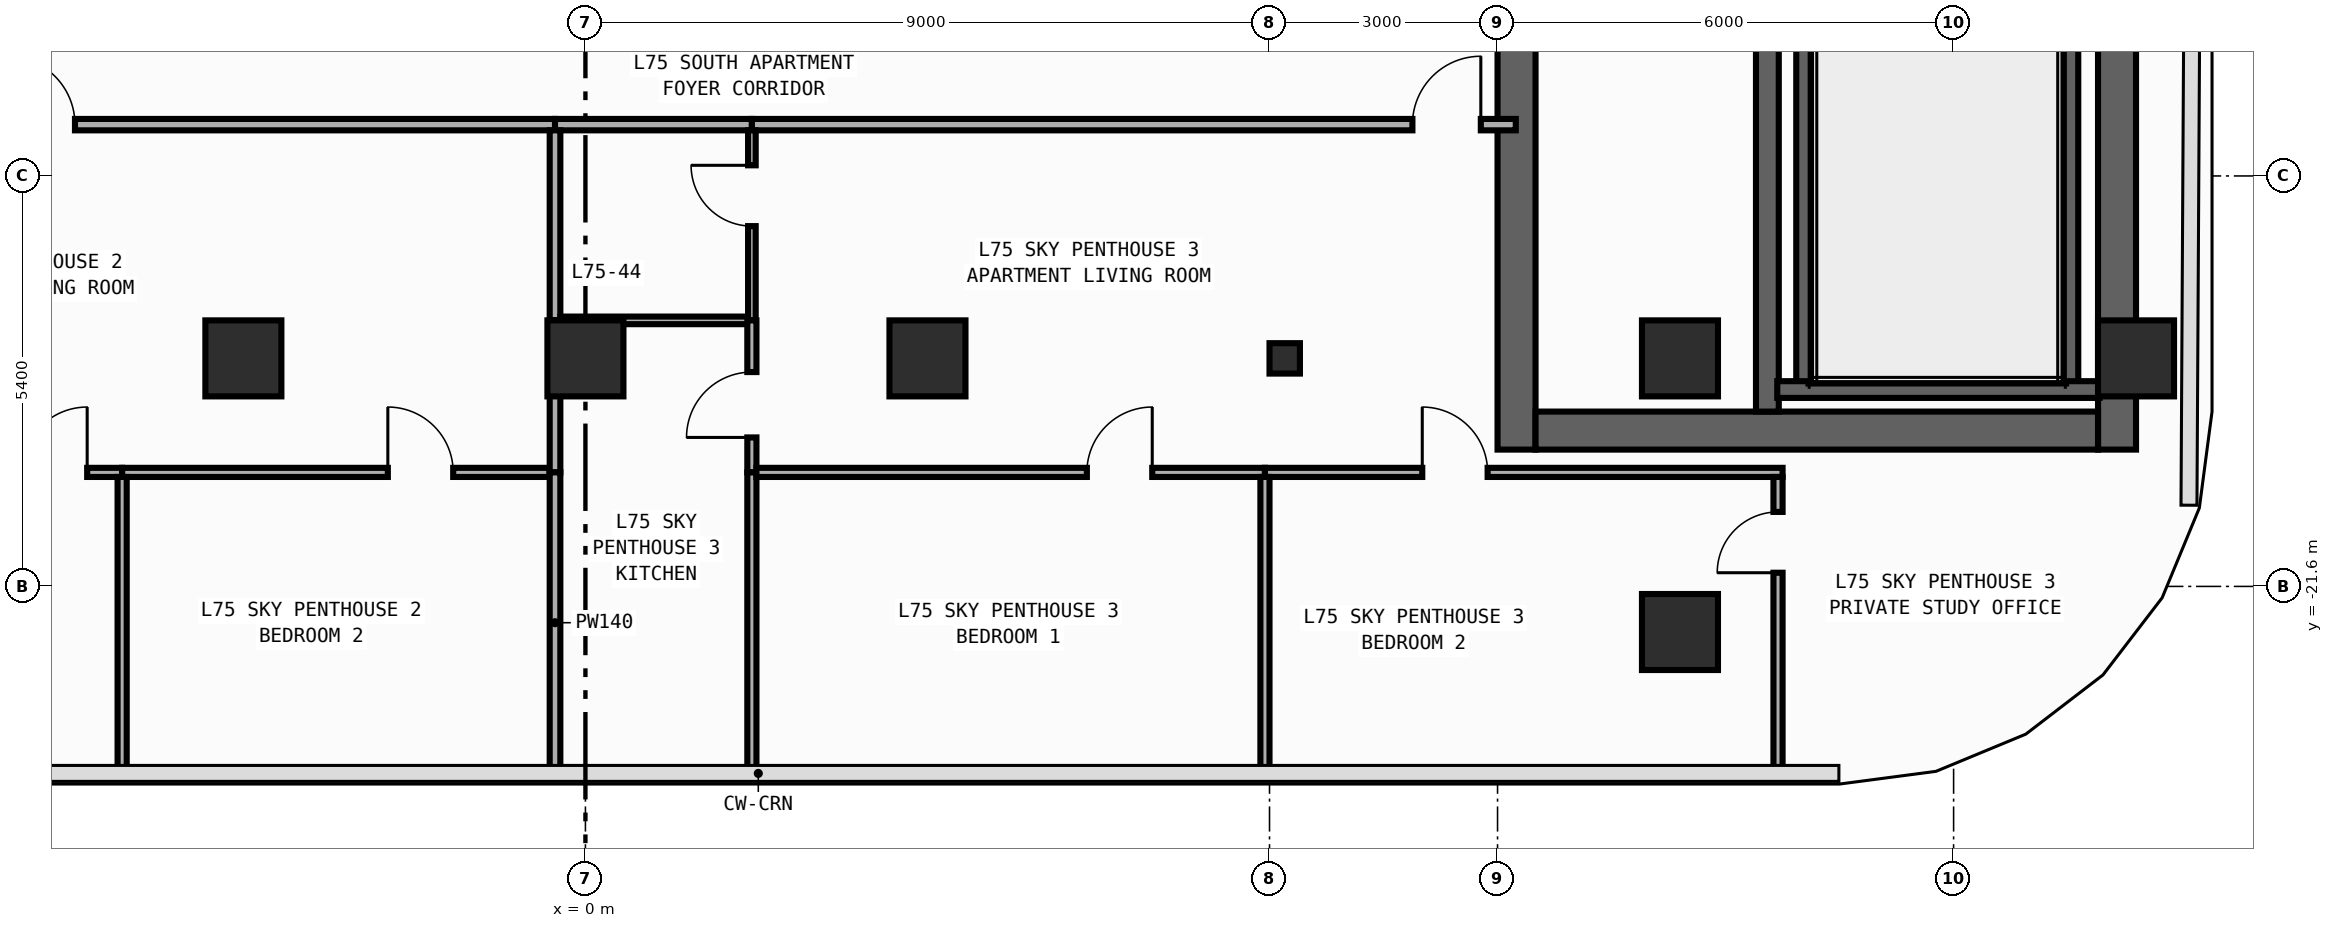
"""IFC4 building model, lengths in metres.
Left out: names, types, materials, properties, quantities, classifications, styles, units other than length and angle.
Written with IfcOpenShell. Run it as: python <this file> out.ifc"""

import sys

from ifc_helpers import new_model, si_unit, direction, frame, frame_2d, origin, origin_2d, place, context, subcontext, project, spatial, rectangle, circle, i_section, extrude, element, fill, save


model = new_model("IFC4")
c1 = context("Model", 3, precision=1e-05, world=origin(), true_north=direction((0.0, 1.0)))
c2 = subcontext(c1, "Body", "Model", "MODEL_VIEW")
j1 = project(units=[si_unit("LENGTHUNIT", "METRE"), si_unit("PLANEANGLEUNIT", "RADIAN")], contexts=[c1])
p1 = place(None, origin())
s1 = spatial("IfcSite", under=j1, at=p1, CompositionType="ELEMENT")
p2 = place(p1, origin())
s2 = spatial("IfcBuilding", under=s1, at=p2, CompositionType="ELEMENT")
p3 = place(p2, frame((0.0, 0.0, 311.8)))
s3 = spatial("IfcBuildingStorey", under=s2, at=p3, CompositionType="ELEMENT", Elevation=311.8)
p4 = place(p3, frame((12.25, -19.8, 0.0), z_axis=(0.0, 0.0, 1.0), x_axis=(0.0, 1.0, 0.0)))
e1 = element("IfcWall", 1, at=p4, inside=s3, PredefinedType="SHEAR", context=c2, shape_type="SweptSolid", body=[
    extrude(rectangle(XDim=27.0, YDim=0.5, at=frame_2d((13.5, 0.0))), origin(), (0.0, 0.0, 1.0), 3.54),
])
p5 = place(p4, frame((23.05, 0.0, 0.0)))
e2 = element("IfcOpeningElement", 2, at=p5, cuts=e1, PredefinedType="OPENING", context=c2, shape_type="SweptSolid", body=[
    extrude(rectangle(XDim=1.1, YDim=2.2, at=frame_2d((0.55, 1.1))), frame((0.0, 0.26, 0.0), z_axis=(0.0, -1.0, 0.0), x_axis=(1.0, 0.0, 0.0)), (0.0, 0.0, 1.0), 0.52),
])
p6 = place(p4, frame((19.85, 0.0, 0.0)))
e3 = element("IfcOpeningElement", 3, at=p6, cuts=e1, PredefinedType="OPENING", context=c2, shape_type="SweptSolid", body=[
    extrude(rectangle(XDim=1.1, YDim=2.2, at=frame_2d((0.55, 1.1))), frame((0.0, 0.26, 0.0), z_axis=(0.0, -1.0, 0.0), x_axis=(1.0, 0.0, 0.0)), (0.0, 0.0, 1.0), 0.52),
])
p7 = place(p4, frame((16.65, 0.0, 0.0)))
e4 = element("IfcOpeningElement", 4, at=p7, cuts=e1, PredefinedType="OPENING", context=c2, shape_type="SweptSolid", body=[
    extrude(rectangle(XDim=1.1, YDim=2.2, at=frame_2d((0.55, 1.1))), frame((0.0, 0.26, 0.0), z_axis=(0.0, -1.0, 0.0), x_axis=(1.0, 0.0, 0.0)), (0.0, 0.0, 1.0), 0.52),
])
p8 = place(p4, frame((10.175, 0.0, 0.0)))
e5 = element("IfcOpeningElement", 5, at=p8, cuts=e1, PredefinedType="OPENING", context=c2, shape_type="SweptSolid", body=[
    extrude(rectangle(XDim=0.85, YDim=2.1, at=frame_2d((0.425, 1.05))), frame((0.0, 0.26, 0.0), z_axis=(0.0, -1.0, 0.0), x_axis=(1.0, 0.0, 0.0)), (0.0, 0.0, 1.0), 0.52),
])
p9 = place(p4, frame((12.725, 0.0, 0.0)))
e6 = element("IfcOpeningElement", 6, at=p9, cuts=e1, PredefinedType="OPENING", context=c2, shape_type="SweptSolid", body=[
    extrude(rectangle(XDim=1.15, YDim=2.2, at=frame_2d((0.575, 1.1))), frame((0.0, 0.26, 0.0), z_axis=(0.0, -1.0, 0.0), x_axis=(1.0, 0.0, 0.0)), (0.0, 0.0, 1.0), 0.52),
])
p10 = place(p4, frame((25.125, 0.0, 0.0)))
e7 = element("IfcOpeningElement", 7, at=p10, cuts=e1, PredefinedType="OPENING", context=c2, shape_type="SweptSolid", body=[
    extrude(rectangle(XDim=0.85, YDim=2.1, at=frame_2d((0.425, 1.05))), frame((0.0, 0.26, 0.0), z_axis=(0.0, -1.0, 0.0), x_axis=(1.0, 0.0, 0.0)), (0.0, 0.0, 1.0), 0.52),
])
p11 = place(p3, frame((20.15, -19.8, 0.0), z_axis=(0.0, 0.0, 1.0), x_axis=(0.0, 1.0, 0.0)))
e8 = element("IfcWall", 8, at=p11, inside=s3, PredefinedType="SHEAR", context=c2, shape_type="SweptSolid", body=[
    extrude(rectangle(XDim=27.0, YDim=0.5, at=frame_2d((13.5, 0.0))), origin(), (0.0, 0.0, 1.0), 3.54),
])
p12 = place(p3, frame((12.5, -19.55, 0.0), z_axis=(0.0, 0.0, 1.0), x_axis=(1.0, 0.0, 0.0)))
e9 = element("IfcWall", 9, at=p12, inside=s3, PredefinedType="SHEAR", context=c2, shape_type="SweptSolid", body=[
    extrude(rectangle(XDim=7.4, YDim=0.5, at=frame_2d((3.7, 0.0))), origin(), (0.0, 0.0, 1.0), 3.54),
])
p13 = place(p3, frame((15.55, -19.3, 0.0), z_axis=(0.0, 0.0, 1.0), x_axis=(0.0, 1.0, 0.0)))
e10 = element("IfcWall", 10, at=p13, inside=s3, PredefinedType="SHEAR", context=c2, shape_type="SweptSolid", body=[
    extrude(rectangle(XDim=26.0, YDim=0.3, at=frame_2d((13.0, 0.0))), origin(), (0.0, 0.0, 1.0), 3.54),
])
p14 = place(p13, frame((12.225, 0.0, 0.0)))
e11 = element("IfcOpeningElement", 11, at=p14, cuts=e10, PredefinedType="OPENING", context=c2, shape_type="SweptSolid", body=[
    extrude(rectangle(XDim=1.15, YDim=2.2, at=frame_2d((0.575, 1.1))), frame((0.0, 0.16, 0.0), z_axis=(0.0, -1.0, 0.0), x_axis=(1.0, 0.0, 0.0)), (0.0, 0.0, 1.0), 0.32),
])
p15 = place(p13, frame((24.625, 0.0, 0.0)))
e12 = element("IfcOpeningElement", 12, at=p15, cuts=e10, PredefinedType="OPENING", context=c2, shape_type="SweptSolid", body=[
    extrude(rectangle(XDim=0.85, YDim=2.1, at=frame_2d((0.425, 1.05))), frame((0.0, 0.16, 0.0), z_axis=(0.0, -1.0, 0.0), x_axis=(1.0, 0.0, 0.0)), (0.0, 0.0, 1.0), 0.32),
])
for number, where, z_axis, x_axis in (
    (13, (16.04, -19.01, 0.0), (0.0, 0.0, 1.0), (0.0, 1.0, 0.0)),
    (14, (19.53, -19.01, 0.0), (0.0, 0.0, 1.0), (0.0, 1.0, 0.0)),
):
    element("IfcWall", number, at=place(p3, frame(where, z_axis=z_axis, x_axis=x_axis)), inside=s3, PredefinedType="SHEAR", context=c2, shape_type="SweptSolid", body=[
        extrude(rectangle(XDim=11.42, YDim=0.22, at=frame_2d((5.71, 0.0))), origin(), (0.0, 0.0, 1.0), 3.54),
    ])
p16 = place(p3, frame((15.68, -19.01, 0.0), z_axis=(0.0, 0.0, 1.0), x_axis=(1.0, 0.0, 0.0)))
e15 = element("IfcWall", 15, at=p16, inside=s3, PredefinedType="SHEAR", context=c2, shape_type="SweptSolid", body=[
    extrude(rectangle(XDim=4.24, YDim=0.22, at=frame_2d((2.12, 0.0))), origin(), (0.0, 0.0, 1.0), 3.54),
])
p17 = place(p3, frame((9.2, -18.6, 0.0), z_axis=(0.0, 0.0, 1.0), x_axis=(1.0, 0.0, 0.0)))
e16 = element("IfcColumn", 16, at=p17, inside=s3, PredefinedType="COLUMN", context=c2, shape_type="SweptSolid", body=[
    extrude(i_section(OverallWidth=0.4, OverallDepth=0.4, WebThickness=0.013, FlangeThickness=0.021, FilletRadius=0.022, at=origin_2d()), origin(), (0.0, 0.0, 1.0), 3.8),
])
for number, where, z_axis, x_axis in (
    (17, (20.4, -18.6, 0.0), (0.0, 0.0, 1.0), (1.0, 0.0, 0.0)),
    (18, (14.4, -18.6, 0.0), (0.0, 0.0, 1.0), (1.0, 0.0, 0.0)),
    (19, (-4.5, -18.6, 0.0), (0.0, 0.0, 1.0), (1.0, 0.0, 0.0)),
    (20, (0.0, -18.6, 0.0), (0.0, 0.0, 1.0), (1.0, 0.0, 0.0)),
    (21, (4.5, -18.6, 0.0), (0.0, 0.0, 1.0), (1.0, 0.0, 0.0)),
    (22, (14.4, -22.2, 0.0), (0.0, 0.0, 1.0), (1.0, 0.0, 0.0)),
):
    element("IfcColumn", number, at=place(p3, frame(where, z_axis=z_axis, x_axis=x_axis)), inside=s3, PredefinedType="COLUMN", context=c2, shape_type="SweptSolid", body=[
        extrude(circle(Radius=0.5, at=origin_2d()), origin(), (0.0, 0.0, 1.0), 3.8),
    ])
p18 = place(p3, frame((-11.71, -15.525, 0.0), z_axis=(0.0, 0.0, 1.0), x_axis=(1.0, 0.0, 0.0)))
e23 = element("IfcWall", 23, at=p18, inside=s3, PredefinedType="PARTITIONING", context=c2, shape_type="SweptSolid", body=[
    extrude(rectangle(XDim=11.31, YDim=0.15, at=frame_2d((5.655, 0.0))), origin(), (0.0, 0.0, 1.0), 3.54),
])
p19 = place(p18, frame((4.094, 0.0, 0.0)))
e24 = element("IfcOpeningElement", 24, at=p19, cuts=e23, PredefinedType="OPENING", context=c2, shape_type="SweptSolid", body=[
    extrude(rectangle(XDim=0.9, YDim=2.15, at=frame_2d((0.45, 1.075))), frame((0.0, 0.085, 0.0), z_axis=(0.0, -1.0, 0.0), x_axis=(1.0, 0.0, 0.0)), (0.0, 0.0, 1.0), 0.17),
])
p20 = place(p3, frame((-0.4, -15.525, 0.0), z_axis=(0.0, 0.0, 1.0), x_axis=(1.0, 0.0, 0.0)))
e25 = element("IfcWall", 25, at=p20, inside=s3, PredefinedType="PARTITIONING", context=c2, shape_type="SweptSolid", body=[
    extrude(rectangle(XDim=2.59, YDim=0.15, at=frame_2d((1.295, 0.0))), origin(), (0.0, 0.0, 1.0), 3.54),
])
p21 = place(p3, frame((2.19, -15.525, 0.0), z_axis=(0.0, 0.0, 1.0), x_axis=(1.0, 0.0, 0.0)))
e26 = element("IfcWall", 26, at=p21, inside=s3, PredefinedType="PARTITIONING", context=c2, shape_type="SweptSolid", body=[
    extrude(rectangle(XDim=10.05, YDim=0.15, at=frame_2d((5.025, 0.0))), origin(), (0.0, 0.0, 1.0), 3.54),
])
p22 = place(p21, frame((8.69, 0.0, 0.0)))
e27 = element("IfcOpeningElement", 27, at=p22, cuts=e26, PredefinedType="OPENING", context=c2, shape_type="SweptSolid", body=[
    extrude(rectangle(XDim=0.9, YDim=2.15, at=frame_2d((0.45, 1.075))), frame((0.0, 0.085, 0.0), z_axis=(0.0, -1.0, 0.0), x_axis=(1.0, 0.0, 0.0)), (0.0, 0.0, 1.0), 0.17),
])
p23 = place(p3, frame((-11.65, -20.1, 0.0), z_axis=(0.0, 0.0, 1.0), x_axis=(1.0, 0.0, 0.0)))
e28 = element("IfcWall", 28, at=p23, inside=s3, PredefinedType="PARTITIONING", context=c2, shape_type="SweptSolid", body=[
    extrude(rectangle(XDim=5.555, YDim=0.12, at=frame_2d((2.777, 0.0))), origin(), (0.0, 0.0, 1.0), 3.54),
])
p24 = place(p23, frame((4.235, 0.0, 0.0)))
e29 = element("IfcOpeningElement", 29, at=p24, cuts=e28, PredefinedType="OPENING", context=c2, shape_type="SweptSolid", body=[
    extrude(rectangle(XDim=0.86, YDim=2.15, at=frame_2d((0.43, 1.075))), frame((0.0, 0.07, 0.0), z_axis=(0.0, -1.0, 0.0), x_axis=(1.0, 0.0, 0.0)), (0.0, 0.0, 1.0), 0.14),
])
p25 = place(p3, frame((-6.095, -20.1, 0.0), z_axis=(0.0, 0.0, 1.0), x_axis=(1.0, 0.0, 0.0)))
e30 = element("IfcWall", 30, at=p25, inside=s3, PredefinedType="PARTITIONING", context=c2, shape_type="SweptSolid", body=[
    extrude(rectangle(XDim=5.625, YDim=0.12, at=frame_2d((2.812, 0.0))), origin(), (0.0, 0.0, 1.0), 3.54),
])
p26 = place(p25, frame((3.496, 0.0, 0.0)))
e31 = element("IfcOpeningElement", 31, at=p26, cuts=e30, PredefinedType="OPENING", context=c2, shape_type="SweptSolid", body=[
    extrude(rectangle(XDim=0.86, YDim=2.15, at=frame_2d((0.43, 1.075))), frame((0.0, 0.07, 0.0), z_axis=(0.0, -1.0, 0.0), x_axis=(1.0, 0.0, 0.0)), (0.0, 0.0, 1.0), 0.14),
])
p27 = place(p3, frame((-0.4, -18.1, 0.0), z_axis=(0.0, 0.0, 1.0), x_axis=(0.0, 1.0, 0.0)))
e32 = element("IfcWall", 32, at=p27, inside=s3, PredefinedType="PARTITIONING", context=c2, shape_type="SweptSolid", body=[
    extrude(rectangle(XDim=2.5, YDim=0.14, at=frame_2d((1.25, 0.0))), origin(), (0.0, 0.0, 1.0), 3.54),
])
p28 = place(p3, frame((-0.4, -20.1, 0.0), z_axis=(0.0, 0.0, 1.0), x_axis=(0.0, 1.0, 0.0)))
e33 = element("IfcWall", 33, at=p28, inside=s3, PredefinedType="PARTITIONING", context=c2, shape_type="SweptSolid", body=[
    extrude(rectangle(XDim=2.0, YDim=0.14, at=frame_2d((1.0, 0.0))), origin(), (0.0, 0.0, 1.0), 3.54),
])
p29 = place(p3, frame((-6.095, -24.055, 0.0), z_axis=(0.0, 0.0, 1.0), x_axis=(0.0, 1.0, 0.0)))
e34 = element("IfcWall", 34, at=p29, inside=s3, PredefinedType="PARTITIONING", context=c2, shape_type="SweptSolid", body=[
    extrude(rectangle(XDim=3.895, YDim=0.12, at=frame_2d((1.948, 0.0))), origin(), (0.0, 0.0, 1.0), 3.54),
])
p30 = place(p3, frame((-0.4, -24.055, 0.0), z_axis=(0.0, 0.0, 1.0), x_axis=(0.0, 1.0, 0.0)))
e35 = element("IfcWall", 35, at=p30, inside=s3, PredefinedType="PARTITIONING", context=c2, shape_type="SweptSolid", body=[
    extrude(rectangle(XDim=3.955, YDim=0.14, at=frame_2d((1.978, 0.0))), origin(), (0.0, 0.0, 1.0), 3.54),
])
p31 = place(p3, frame((-0.33, -18.1, 0.0), z_axis=(0.0, 0.0, 1.0), x_axis=(1.0, 0.0, 0.0)))
e36 = element("IfcWall", 36, at=p31, inside=s3, PredefinedType="PARTITIONING", context=c2, shape_type="SweptSolid", body=[
    extrude(rectangle(XDim=2.47, YDim=0.1, at=frame_2d((1.235, 0.0))), origin(), (0.0, 0.0, 1.0), 3.54),
])
p32 = place(p3, frame((2.19, -18.1, 0.0), z_axis=(0.0, 0.0, 1.0), x_axis=(0.0, 1.0, 0.0)))
e37 = element("IfcWall", 37, at=p32, inside=s3, PredefinedType="PARTITIONING", context=c2, shape_type="SweptSolid", body=[
    extrude(rectangle(XDim=2.5, YDim=0.1, at=frame_2d((1.25, 0.0))), origin(), (0.0, 0.0, 1.0), 3.54),
])
p33 = place(p32, frame((1.24, 0.0, 0.0)))
e38 = element("IfcOpeningElement", 38, at=p33, cuts=e37, PredefinedType="OPENING", context=c2, shape_type="SweptSolid", body=[
    extrude(rectangle(XDim=0.8, YDim=2.1, at=frame_2d((0.4, 1.05))), frame((0.0, 0.06, 0.0), z_axis=(0.0, -1.0, 0.0), x_axis=(1.0, 0.0, 0.0)), (0.0, 0.0, 1.0), 0.12),
])
p34 = place(p3, frame((2.19, -20.1, 0.0), z_axis=(0.0, 0.0, 1.0), x_axis=(0.0, 1.0, 0.0)))
e39 = element("IfcWall", 39, at=p34, inside=s3, PredefinedType="PARTITIONING", context=c2, shape_type="SweptSolid", body=[
    extrude(rectangle(XDim=2.0, YDim=0.12, at=frame_2d((1.0, 0.0))), origin(), (0.0, 0.0, 1.0), 3.54),
])
p35 = place(p34, frame((0.46, 0.0, 0.0)))
e40 = element("IfcOpeningElement", 40, at=p35, cuts=e39, PredefinedType="OPENING", context=c2, shape_type="SweptSolid", body=[
    extrude(rectangle(XDim=0.86, YDim=2.15, at=frame_2d((0.43, 1.075))), frame((0.0, 0.07, 0.0), z_axis=(0.0, -1.0, 0.0), x_axis=(1.0, 0.0, 0.0)), (0.0, 0.0, 1.0), 0.14),
])
p36 = place(p3, frame((2.19, -24.055, 0.0), z_axis=(0.0, 0.0, 1.0), x_axis=(0.0, 1.0, 0.0)))
e41 = element("IfcWall", 41, at=p36, inside=s3, PredefinedType="PARTITIONING", context=c2, shape_type="SweptSolid", body=[
    extrude(rectangle(XDim=3.955, YDim=0.12, at=frame_2d((1.978, 0.0))), origin(), (0.0, 0.0, 1.0), 3.54),
])
p37 = place(p3, frame((2.25, -20.1, 0.0), z_axis=(0.0, 0.0, 1.0), x_axis=(1.0, 0.0, 0.0)))
e42 = element("IfcWall", 42, at=p37, inside=s3, PredefinedType="PARTITIONING", context=c2, shape_type="SweptSolid", body=[
    extrude(rectangle(XDim=6.69, YDim=0.12, at=frame_2d((3.345, 0.0))), origin(), (0.0, 0.0, 1.0), 3.54),
])
p38 = place(p37, frame((4.347, 0.0, 0.0)))
e43 = element("IfcOpeningElement", 43, at=p38, cuts=e42, PredefinedType="OPENING", context=c2, shape_type="SweptSolid", body=[
    extrude(rectangle(XDim=0.86, YDim=2.15, at=frame_2d((0.43, 1.075))), frame((0.0, 0.07, 0.0), z_axis=(0.0, -1.0, 0.0), x_axis=(1.0, 0.0, 0.0)), (0.0, 0.0, 1.0), 0.14),
])
p39 = place(p3, frame((8.94, -20.1, 0.0), z_axis=(0.0, 0.0, 1.0), x_axis=(1.0, 0.0, 0.0)))
e44 = element("IfcWall", 44, at=p39, inside=s3, PredefinedType="PARTITIONING", context=c2, shape_type="SweptSolid", body=[
    extrude(rectangle(XDim=6.81, YDim=0.12, at=frame_2d((3.405, 0.0))), origin(), (0.0, 0.0, 1.0), 3.54),
])
p40 = place(p39, frame((2.07, 0.0, 0.0)))
e45 = element("IfcOpeningElement", 45, at=p40, cuts=e44, PredefinedType="OPENING", context=c2, shape_type="SweptSolid", body=[
    extrude(rectangle(XDim=0.86, YDim=2.15, at=frame_2d((0.43, 1.075))), frame((0.0, 0.07, 0.0), z_axis=(0.0, -1.0, 0.0), x_axis=(1.0, 0.0, 0.0)), (0.0, 0.0, 1.0), 0.14),
])
p41 = place(p3, frame((15.69, -24.055, 0.0), z_axis=(0.0, 0.0, 1.0), x_axis=(0.0, 1.0, 0.0)))
e46 = element("IfcWall", 46, at=p41, inside=s3, PredefinedType="PARTITIONING", context=c2, shape_type="SweptSolid", body=[
    extrude(rectangle(XDim=3.895, YDim=0.12, at=frame_2d((1.948, 0.0))), origin(), (0.0, 0.0, 1.0), 3.54),
])
p42 = place(p41, frame((2.635, 0.0, 0.0)))
e47 = element("IfcOpeningElement", 47, at=p42, cuts=e46, PredefinedType="OPENING", context=c2, shape_type="SweptSolid", body=[
    extrude(rectangle(XDim=0.8, YDim=2.1, at=frame_2d((0.4, 1.05))), frame((0.0, 0.07, 0.0), z_axis=(0.0, -1.0, 0.0), x_axis=(1.0, 0.0, 0.0)), (0.0, 0.0, 1.0), 0.14),
])
p43 = place(p3, frame((8.94, -24.055, 0.0), z_axis=(0.0, 0.0, 1.0), x_axis=(0.0, 1.0, 0.0)))
e48 = element("IfcWall", 48, at=p43, inside=s3, PredefinedType="PARTITIONING", context=c2, shape_type="SweptSolid", body=[
    extrude(rectangle(XDim=3.895, YDim=0.12, at=frame_2d((1.948, 0.0))), origin(), (0.0, 0.0, 1.0), 3.54),
])
p44 = place(p19, origin())
e49 = element("IfcDoor", 49, at=p44, inside=s3, OperationType="SINGLE_SWING_LEFT", PredefinedType="DOOR", context=c2, shape_type="SweptSolid", body=[
    extrude(rectangle(XDim=0.9, YDim=2.15, at=frame_2d((0.45, 1.075))), frame((0.0, 0.025, 0.0), z_axis=(0.0, -1.0, 0.0), x_axis=(1.0, 0.0, 0.0)), (0.0, 0.0, 1.0), 0.05),
])
fill(e24, e49)
p45 = place(p22, origin())
e50 = element("IfcDoor", 50, at=p45, inside=s3, OperationType="SINGLE_SWING_RIGHT", PredefinedType="DOOR", context=c2, shape_type="SweptSolid", body=[
    extrude(rectangle(XDim=0.9, YDim=2.15, at=frame_2d((0.45, 1.075))), frame((0.0, 0.025, 0.0), z_axis=(0.0, -1.0, 0.0), x_axis=(1.0, 0.0, 0.0)), (0.0, 0.0, 1.0), 0.05),
])
fill(e27, e50)
p46 = place(p24, origin())
e51 = element("IfcDoor", 51, at=p46, inside=s3, OperationType="SINGLE_SWING_RIGHT", PredefinedType="DOOR", context=c2, shape_type="SweptSolid", body=[
    extrude(rectangle(XDim=0.86, YDim=2.15, at=frame_2d((0.43, 1.075))), frame((0.0, 0.025, 0.0), z_axis=(0.0, -1.0, 0.0), x_axis=(1.0, 0.0, 0.0)), (0.0, 0.0, 1.0), 0.05),
])
fill(e29, e51)
p47 = place(p26, origin())
e52 = element("IfcDoor", 52, at=p47, inside=s3, OperationType="SINGLE_SWING_LEFT", PredefinedType="DOOR", context=c2, shape_type="SweptSolid", body=[
    extrude(rectangle(XDim=0.86, YDim=2.15, at=frame_2d((0.43, 1.075))), frame((0.0, 0.025, 0.0), z_axis=(0.0, -1.0, 0.0), x_axis=(1.0, 0.0, 0.0)), (0.0, 0.0, 1.0), 0.05),
])
fill(e31, e52)
p48 = place(p33, origin())
e53 = element("IfcDoor", 53, at=p48, inside=s3, OperationType="SINGLE_SWING_RIGHT", PredefinedType="DOOR", context=c2, shape_type="SweptSolid", body=[
    extrude(rectangle(XDim=0.8, YDim=2.1, at=frame_2d((0.4, 1.05))), frame((0.0, 0.025, 0.0), z_axis=(0.0, -1.0, 0.0), x_axis=(1.0, 0.0, 0.0)), (0.0, 0.0, 1.0), 0.05),
])
fill(e38, e53)
p49 = place(p35, origin())
e54 = element("IfcDoor", 54, at=p49, inside=s3, OperationType="SINGLE_SWING_LEFT", PredefinedType="DOOR", context=c2, shape_type="SweptSolid", body=[
    extrude(rectangle(XDim=0.86, YDim=2.15, at=frame_2d((0.43, 1.075))), frame((0.0, 0.025, 0.0), z_axis=(0.0, -1.0, 0.0), x_axis=(1.0, 0.0, 0.0)), (0.0, 0.0, 1.0), 0.05),
])
fill(e40, e54)
p50 = place(p38, origin())
e55 = element("IfcDoor", 55, at=p50, inside=s3, OperationType="SINGLE_SWING_RIGHT", PredefinedType="DOOR", context=c2, shape_type="SweptSolid", body=[
    extrude(rectangle(XDim=0.86, YDim=2.15, at=frame_2d((0.43, 1.075))), frame((0.0, 0.025, 0.0), z_axis=(0.0, -1.0, 0.0), x_axis=(1.0, 0.0, 0.0)), (0.0, 0.0, 1.0), 0.05),
])
fill(e43, e55)
p51 = place(p40, origin())
e56 = element("IfcDoor", 56, at=p51, inside=s3, OperationType="SINGLE_SWING_LEFT", PredefinedType="DOOR", context=c2, shape_type="SweptSolid", body=[
    extrude(rectangle(XDim=0.86, YDim=2.15, at=frame_2d((0.43, 1.075))), frame((0.0, 0.025, 0.0), z_axis=(0.0, -1.0, 0.0), x_axis=(1.0, 0.0, 0.0)), (0.0, 0.0, 1.0), 0.05),
])
fill(e45, e56)
p52 = place(p42, origin())
e57 = element("IfcDoor", 57, at=p52, inside=s3, OperationType="SINGLE_SWING_LEFT", PredefinedType="DOOR", context=c2, shape_type="SweptSolid", body=[
    extrude(rectangle(XDim=0.8, YDim=2.1, at=frame_2d((0.4, 1.05))), frame((0.0, 0.025, 0.0), z_axis=(0.0, -1.0, 0.0), x_axis=(1.0, 0.0, 0.0)), (0.0, 0.0, 1.0), 0.05),
])
fill(e47, e57)
save(model, sys.argv[1])
